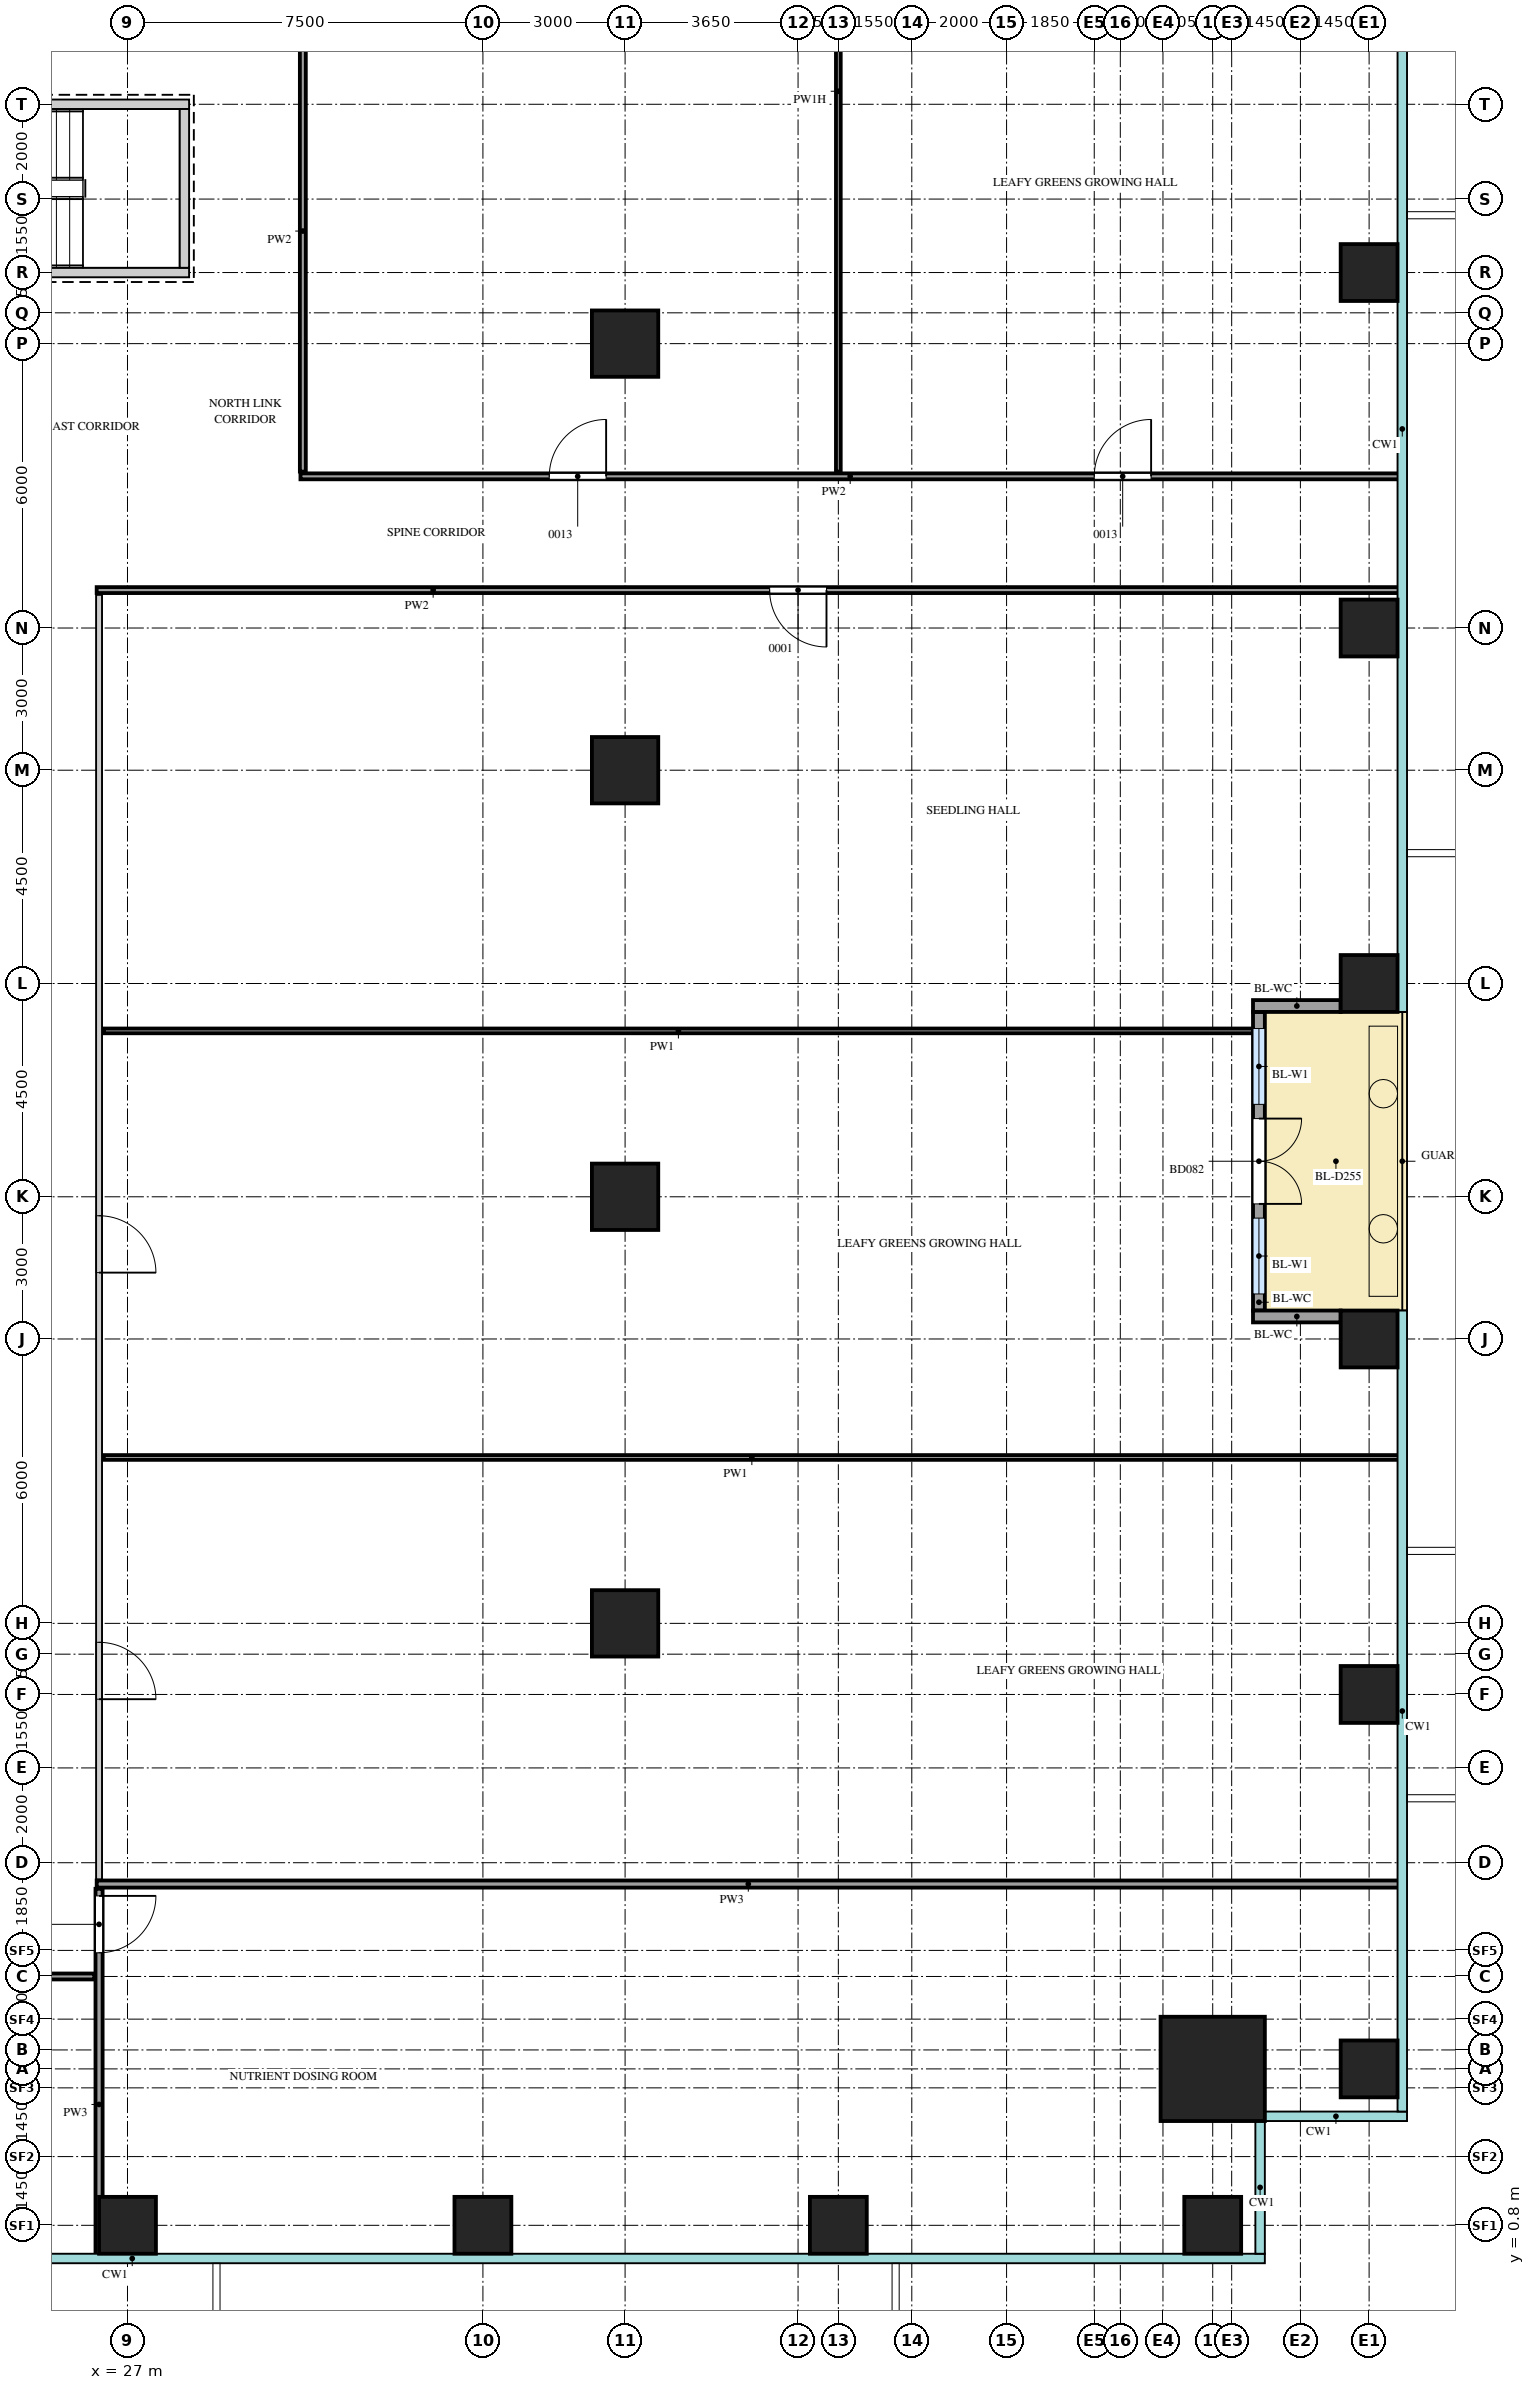
"""IFC4 building model, lengths in metres.
Left out: names, types, materials, properties, quantities, classifications, styles, units other than length and angle.
Written with IfcOpenShell. Run it as: python <this file> out.ifc"""

import sys

from ifc_helpers import new_model, si_unit, direction, frame, frame_2d, origin, origin_2d, place, context, subcontext, project, spatial, rectangle, extrude, source, transform, mapped, element, fill, save


model = new_model("IFC4")
c1 = context("Model", 3, precision=1e-05, world=origin(), true_north=direction((0.0, 1.0)))
c2 = subcontext(c1, "Body", "Model", "MODEL_VIEW")
j1 = project(units=[si_unit("LENGTHUNIT", "METRE"), si_unit("PLANEANGLEUNIT", "RADIAN")], contexts=[c1])
p1 = place(None, origin())
s1 = spatial("IfcSite", under=j1, at=p1, CompositionType="ELEMENT")
p2 = place(p1, origin())
s2 = spatial("IfcBuilding", under=s1, at=p2, CompositionType="ELEMENT")
p3 = place(p2, frame((0.0, 0.0, 42.0)))
s3 = spatial("IfcBuildingStorey", under=s2, at=p3, CompositionType="ELEMENT", Elevation=42.0)
m1 = source(origin(), c2, "Body", "SweptSolid", [
    extrude(rectangle(XDim=7.1, YDim=0.2, at=frame_2d((3.55, 0.0))), origin(), (0.0, 0.0, 1.0), 4.2),
])
p4 = place(p3, frame((21.2, 45.55, 0.0), z_axis=(0.0, 0.0, 1.0), x_axis=(1.0, 0.0, 0.0)))
e1 = element("IfcWall", 1, at=p4, inside=s3, PredefinedType="SHEAR", context=c2, shape_type="MappedRepresentation", body=[
    mapped(m1, transform((0.0, 0.0, 0.0))),
])
m2 = source(origin(), c2, "Body", "SweptSolid", [
    extrude(rectangle(XDim=1.2, YDim=2.1, at=frame_2d((0.6, 1.05))), frame((0.0, 0.11, 0.0), z_axis=(0.0, -1.0, 0.0), x_axis=(1.0, 0.0, 0.0)), (0.0, 0.0, 1.0), 0.22),
])
p5 = place(p4, frame((0.15, 0.0, 0.0)))
e2 = element("IfcOpeningElement", 2, at=p5, cuts=e1, PredefinedType="OPENING", context=c2, shape_type="MappedRepresentation", body=[
    mapped(m2, transform((0.0, 0.0, 0.0))),
])
p6 = place(p3, frame((21.2, 42.0, 0.0), z_axis=(0.0, 0.0, 1.0), x_axis=(1.0, 0.0, 0.0)))
e3 = element("IfcWall", 3, at=p6, inside=s3, PredefinedType="SHEAR", context=c2, shape_type="MappedRepresentation", body=[
    mapped(m1, transform((0.0, 0.0, 0.0))),
])
m3 = source(origin(), c2, "Body", "SweptSolid", [
    extrude(rectangle(XDim=3.35, YDim=0.2, at=frame_2d((1.675, 0.0))), origin(), (0.0, 0.0, 1.0), 4.2),
])
p7 = place(p3, frame((28.2, 42.1, 0.0), z_axis=(0.0, 0.0, 1.0), x_axis=(0.0, 1.0, 0.0)))
e4 = element("IfcWall", 4, at=p7, inside=s3, PredefinedType="SHEAR", context=c2, shape_type="MappedRepresentation", body=[
    mapped(m3, transform((0.0, 0.0, 0.0))),
])
m4 = source(origin(), c2, "Body", "SweptSolid", [
    extrude(rectangle(XDim=2.2, YDim=2.2, at=origin_2d()), origin(), (0.0, 0.0, 1.0), 4.5),
])
p8 = place(p3, frame((49.9, 4.1, 0.0), z_axis=(0.0, 0.0, 1.0), x_axis=(1.0, 0.0, 0.0)))
e5 = element("IfcColumn", 5, at=p8, inside=s3, PredefinedType="COLUMN", context=c2, shape_type="MappedRepresentation", body=[
    mapped(m4, transform((0.0, 0.0, 0.0))),
])
m5 = source(origin(), c2, "Body", "SweptSolid", [
    extrude(rectangle(XDim=1.2, YDim=1.2, at=origin_2d()), origin(), (0.0, 0.0, 1.0), 4.2),
])
for number, where, z_axis, x_axis in (
    (6, (27.0, 0.8, 0.0), (0.0, 0.0, 1.0), (1.0, 0.0, 0.0)),
    (7, (34.5, 0.8, 0.0), (0.0, 0.0, 1.0), (1.0, 0.0, 0.0)),
    (8, (42.0, 0.8, 0.0), (0.0, 0.0, 1.0), (1.0, 0.0, 0.0)),
    (9, (49.9, 0.8, 0.0), (0.0, 0.0, 1.0), (1.0, 0.0, 0.0)),
    (10, (53.2, 4.1, 0.0), (0.0, 0.0, 1.0), (1.0, 0.0, 0.0)),
    (11, (53.2, 12.0, 0.0), (0.0, 0.0, 1.0), (1.0, 0.0, 0.0)),
    (12, (53.2, 19.5, 0.0), (0.0, 0.0, 1.0), (1.0, 0.0, 0.0)),
    (13, (53.2, 27.0, 0.0), (0.0, 0.0, 1.0), (1.0, 0.0, 0.0)),
    (14, (53.2, 34.5, 0.0), (0.0, 0.0, 1.0), (1.0, 0.0, 0.0)),
    (15, (53.2, 42.0, 0.0), (0.0, 0.0, 1.0), (1.0, 0.0, 0.0)),
):
    element("IfcColumn", number, at=place(p3, frame(where, z_axis=z_axis, x_axis=x_axis)), inside=s3, PredefinedType="COLUMN", context=c2, shape_type="MappedRepresentation", body=[
        mapped(m5, transform((0.0, 0.0, 0.0))),
    ])
m6 = source(origin(), c2, "Body", "SweptSolid", [
    extrude(rectangle(XDim=1.4, YDim=1.4, at=origin_2d()), origin(), (0.0, 0.0, 1.0), 4.2),
])
for number, where, z_axis, x_axis in (
    (16, (37.5, 13.5, 0.0), (0.0, 0.0, 1.0), (1.0, 0.0, 0.0)),
    (17, (37.5, 22.5, 0.0), (0.0, 0.0, 1.0), (1.0, 0.0, 0.0)),
    (18, (37.5, 31.5, 0.0), (0.0, 0.0, 1.0), (1.0, 0.0, 0.0)),
    (19, (37.5, 40.5, 0.0), (0.0, 0.0, 1.0), (1.0, 0.0, 0.0)),
):
    element("IfcColumn", number, at=place(p3, frame(where, z_axis=z_axis, x_axis=x_axis)), inside=s3, PredefinedType="COLUMN", context=c2, shape_type="MappedRepresentation", body=[
        mapped(m6, transform((0.0, 0.0, 0.0))),
    ])
m7 = source(origin(), c2, "Body", "SweptSolid", [
    extrude(rectangle(XDim=6.3, YDim=0.25, at=frame_2d((3.15, 0.0))), origin(), (0.0, 0.0, 1.0), 3.6),
])
p9 = place(p3, frame((50.875, 20.1, 0.0), z_axis=(0.0, 0.0, 1.0), x_axis=(0.0, 1.0, 0.0)))
e20 = element("IfcWall", 20, at=p9, inside=s3, PredefinedType="SOLIDWALL", context=c2, shape_type="MappedRepresentation", body=[
    mapped(m7, transform((0.0, 0.0, 0.0))),
])
m8 = source(origin(), c2, "Body", "SweptSolid", [
    extrude(rectangle(XDim=1.6, YDim=2.4, at=frame_2d((0.8, 1.2))), frame((0.0, 0.135, 0.0), z_axis=(0.0, -1.0, 0.0), x_axis=(1.0, 0.0, 0.0)), (0.0, 0.0, 1.0), 0.27),
])
p10 = place(p9, frame((0.35, 0.0, 0.0)))
e21 = element("IfcOpeningElement", 21, at=p10, cuts=e20, PredefinedType="OPENING", context=c2, shape_type="MappedRepresentation", body=[
    mapped(m8, transform((0.0, 0.0, 0.0))),
])
p11 = place(p9, frame((4.35, 0.0, 0.0)))
e22 = element("IfcOpeningElement", 22, at=p11, cuts=e20, PredefinedType="OPENING", context=c2, shape_type="MappedRepresentation", body=[
    mapped(m8, transform((0.0, 0.0, 0.0))),
])
m9 = source(origin(), c2, "Body", "SweptSolid", [
    extrude(rectangle(XDim=1.8, YDim=2.4, at=frame_2d((0.9, 1.2))), frame((0.0, 0.135, 0.0), z_axis=(0.0, -1.0, 0.0), x_axis=(1.0, 0.0, 0.0)), (0.0, 0.0, 1.0), 0.27),
])
p12 = place(p9, frame((2.25, 0.0, 0.0)))
e23 = element("IfcOpeningElement", 23, at=p12, cuts=e20, PredefinedType="OPENING", context=c2, shape_type="MappedRepresentation", body=[
    mapped(m9, transform((0.0, 0.0, 0.0))),
])
m10 = source(origin(), c2, "Body", "SweptSolid", [
    extrude(rectangle(XDim=1.85, YDim=0.25, at=frame_2d((0.925, 0.0))), origin(), (0.0, 0.0, 1.0), 3.6),
])
for number, where, z_axis, x_axis in (
    (24, (52.6, 19.975, 0.0), (0.0, 0.0, 1.0), (-1.0, 0.0, 0.0)),
    (25, (52.6, 26.525, 0.0), (0.0, 0.0, 1.0), (-1.0, 0.0, 0.0)),
):
    element("IfcWall", number, at=place(p3, frame(where, z_axis=z_axis, x_axis=x_axis)), inside=s3, PredefinedType="SOLIDWALL", context=c2, shape_type="MappedRepresentation", body=[
        mapped(m10, transform((0.0, 0.0, 0.0))),
    ])
m11 = source(origin(), c2, "Body", "SweptSolid", [
    extrude(rectangle(XDim=7.75, YDim=0.15, at=frame_2d((3.875, 0.0))), origin(), (0.0, 0.0, 1.0), 4.3),
])
p13 = place(p3, frame((26.4, 0.15, 0.0), z_axis=(0.0, 0.0, 1.0), x_axis=(0.0, 1.0, 0.0)))
e26 = element("IfcWall", 26, at=p13, inside=s3, PredefinedType="PARTITIONING", context=c2, shape_type="MappedRepresentation", body=[
    mapped(m11, transform((0.0, 0.0, 0.0))),
])
m12 = source(origin(), c2, "Body", "SweptSolid", [
    extrude(rectangle(XDim=1.2, YDim=2.1, at=frame_2d((0.6, 1.05))), frame((0.0, 0.085, 0.0), z_axis=(0.0, -1.0, 0.0), x_axis=(1.0, 0.0, 0.0)), (0.0, 0.0, 1.0), 0.17),
])
p14 = place(p13, frame((6.4, 0.0, 0.0)))
e27 = element("IfcOpeningElement", 27, at=p14, cuts=e26, PredefinedType="OPENING", context=c2, shape_type="MappedRepresentation", body=[
    mapped(m12, transform((0.0, 0.0, 0.0))),
])
m13 = source(origin(), c2, "Body", "SweptSolid", [
    extrude(rectangle(XDim=22.15, YDim=0.125, at=frame_2d((11.075, 0.0))), origin(), (0.0, 0.0, 1.0), 4.3),
])
p15 = place(p3, frame((4.15, 6.05, 0.0), z_axis=(0.0, 0.0, 1.0), x_axis=(1.0, 0.0, 0.0)))
e28 = element("IfcWall", 28, at=p15, inside=s3, PredefinedType="PARTITIONING", context=c2, shape_type="MappedRepresentation", body=[
    mapped(m13, transform((0.0, 0.0, 0.0))),
])
m14 = source(origin(), c2, "Body", "SweptSolid", [
    extrude(rectangle(XDim=0.9, YDim=2.1, at=frame_2d((0.45, 1.05))), frame((0.0, 0.073, 0.0), z_axis=(0.0, -1.0, 0.0), x_axis=(1.0, 0.0, 0.0)), (0.0, 0.0, 1.0), 0.145),
])
p16 = place(p15, frame((3.5, 0.0, 0.0)))
e29 = element("IfcOpeningElement", 29, at=p16, cuts=e28, PredefinedType="OPENING", context=c2, shape_type="MappedRepresentation", body=[
    mapped(m14, transform((0.0, 0.0, 0.0))),
])
m15 = source(origin(), c2, "Body", "SweptSolid", [
    extrude(rectangle(XDim=1.2, YDim=2.1, at=frame_2d((0.6, 1.05))), frame((0.0, 0.073, 0.0), z_axis=(0.0, -1.0, 0.0), x_axis=(1.0, 0.0, 0.0)), (0.0, 0.0, 1.0), 0.145),
])
p17 = place(p15, frame((13.25, 0.0, 0.0)))
e30 = element("IfcOpeningElement", 30, at=p17, cuts=e28, PredefinedType="OPENING", context=c2, shape_type="MappedRepresentation", body=[
    mapped(m15, transform((0.0, 0.0, 0.0))),
])
m16 = source(origin(), c2, "Body", "SweptSolid", [
    extrude(rectangle(XDim=27.5, YDim=0.15, at=frame_2d((13.75, 0.0))), origin(), (0.0, 0.0, 1.0), 4.3),
])
p18 = place(p3, frame((26.35, 8.0, 0.0), z_axis=(0.0, 0.0, 1.0), x_axis=(1.0, 0.0, 0.0)))
e31 = element("IfcWall", 31, at=p18, inside=s3, PredefinedType="PARTITIONING", context=c2, shape_type="MappedRepresentation", body=[
    mapped(m16, transform((0.0, 0.0, 0.0))),
])
m17 = source(origin(), c2, "Body", "SweptSolid", [
    extrude(rectangle(XDim=27.1, YDim=0.125, at=frame_2d((13.55, 0.0))), origin(), (0.0, 0.0, 1.0), 4.3),
])
p19 = place(p3, frame((26.4, 8.1, 0.0), z_axis=(0.0, 0.0, 1.0), x_axis=(0.0, 1.0, 0.0)))
e32 = element("IfcWall", 32, at=p19, inside=s3, PredefinedType="PARTITIONING", context=c2, shape_type="MappedRepresentation", body=[
    mapped(m17, transform((0.0, 0.0, 0.0))),
])
p20 = place(p19, frame((3.8, 0.0, 0.0)))
e33 = element("IfcOpeningElement", 33, at=p20, cuts=e32, PredefinedType="OPENING", context=c2, shape_type="MappedRepresentation", body=[
    mapped(m15, transform((0.0, 0.0, 0.0))),
])
p21 = place(p19, frame((12.8, 0.0, 0.0)))
e34 = element("IfcOpeningElement", 34, at=p21, cuts=e32, PredefinedType="OPENING", context=c2, shape_type="MappedRepresentation", body=[
    mapped(m15, transform((0.0, 0.0, 0.0))),
])
m18 = source(origin(), c2, "Body", "SweptSolid", [
    extrude(rectangle(XDim=27.35, YDim=0.1, at=frame_2d((13.675, 0.0))), origin(), (0.0, 0.0, 1.0), 4.3),
])
p22 = place(p3, frame((26.5, 17.0, 0.0), z_axis=(0.0, 0.0, 1.0), x_axis=(1.0, 0.0, 0.0)))
e35 = element("IfcWall", 35, at=p22, inside=s3, PredefinedType="PARTITIONING", context=c2, shape_type="MappedRepresentation", body=[
    mapped(m18, transform((0.0, 0.0, 0.0))),
])
m19 = source(origin(), c2, "Body", "SweptSolid", [
    extrude(rectangle(XDim=24.25, YDim=0.1, at=frame_2d((12.125, 0.0))), origin(), (0.0, 0.0, 1.0), 4.3),
])
p23 = place(p3, frame((26.5, 26.0, 0.0), z_axis=(0.0, 0.0, 1.0), x_axis=(1.0, 0.0, 0.0)))
e36 = element("IfcWall", 36, at=p23, inside=s3, PredefinedType="PARTITIONING", context=c2, shape_type="MappedRepresentation", body=[
    mapped(m19, transform((0.0, 0.0, 0.0))),
])
m20 = source(origin(), c2, "Body", "SweptSolid", [
    extrude(rectangle(XDim=27.5, YDim=0.125, at=frame_2d((13.75, 0.0))), origin(), (0.0, 0.0, 1.0), 4.3),
])
p24 = place(p3, frame((26.35, 35.3, 0.0), z_axis=(0.0, 0.0, 1.0), x_axis=(1.0, 0.0, 0.0)))
e37 = element("IfcWall", 37, at=p24, inside=s3, PredefinedType="PARTITIONING", context=c2, shape_type="MappedRepresentation", body=[
    mapped(m20, transform((0.0, 0.0, 0.0))),
])
p25 = place(p24, frame((14.2, 0.0, 0.0)))
e38 = element("IfcOpeningElement", 38, at=p25, cuts=e37, PredefinedType="OPENING", context=c2, shape_type="MappedRepresentation", body=[
    mapped(m15, transform((0.0, 0.0, 0.0))),
])
m21 = source(origin(), c2, "Body", "SweptSolid", [
    extrude(rectangle(XDim=23.2, YDim=0.125, at=frame_2d((11.6, 0.0))), origin(), (0.0, 0.0, 1.0), 4.3),
])
p26 = place(p3, frame((30.65, 37.7, 0.0), z_axis=(0.0, 0.0, 1.0), x_axis=(1.0, 0.0, 0.0)))
e39 = element("IfcWall", 39, at=p26, inside=s3, PredefinedType="PARTITIONING", context=c2, shape_type="MappedRepresentation", body=[
    mapped(m21, transform((0.0, 0.0, 0.0))),
])
p27 = place(p26, frame((5.25, 0.0, 0.0)))
e40 = element("IfcOpeningElement", 40, at=p27, cuts=e39, PredefinedType="OPENING", context=c2, shape_type="MappedRepresentation", body=[
    mapped(m15, transform((0.0, 0.0, 0.0))),
])
p28 = place(p26, frame((16.75, 0.0, 0.0)))
e41 = element("IfcOpeningElement", 41, at=p28, cuts=e39, PredefinedType="OPENING", context=c2, shape_type="MappedRepresentation", body=[
    mapped(m15, transform((0.0, 0.0, 0.0))),
])
m22 = source(origin(), c2, "Body", "SweptSolid", [
    extrude(rectangle(XDim=10.15, YDim=0.125, at=frame_2d((5.075, 0.0))), origin(), (0.0, 0.0, 1.0), 4.3),
])
p29 = place(p3, frame((30.7, 37.8, 0.0), z_axis=(0.0, 0.0, 1.0), x_axis=(0.0, 1.0, 0.0)))
e42 = element("IfcWall", 42, at=p29, inside=s3, PredefinedType="PARTITIONING", context=c2, shape_type="MappedRepresentation", body=[
    mapped(m22, transform((0.0, 0.0, 0.0))),
])
m23 = source(origin(), c2, "Body", "SweptSolid", [
    extrude(rectangle(XDim=16.05, YDim=0.1, at=frame_2d((8.025, 0.0))), origin(), (0.0, 0.0, 1.0), 3.7),
])
p30 = place(p3, frame((42.0, 37.8, 0.0), z_axis=(0.0, 0.0, 1.0), x_axis=(0.0, 1.0, 0.0)))
e43 = element("IfcWall", 43, at=p30, inside=s3, PredefinedType="PARTITIONING", context=c2, shape_type="MappedRepresentation", body=[
    mapped(m23, transform((0.0, 0.0, 0.0))),
])
m24 = source(origin(), c2, "Body", "SweptSolid", [
    extrude(rectangle(XDim=1.6, YDim=2.4, at=frame_2d((0.8, 1.2))), frame((0.0, 0.03, 0.0), z_axis=(0.0, -1.0, 0.0), x_axis=(1.0, 0.0, 0.0)), (0.0, 0.0, 1.0), 0.06),
])
p31 = place(p10, origin())
e44 = element("IfcWindow", 44, at=p31, inside=s3, PartitioningType="SINGLE_PANEL", PredefinedType="WINDOW", context=c2, shape_type="MappedRepresentation", body=[
    mapped(m24, transform((0.0, 0.0, 0.0))),
])
fill(e21, e44)
p32 = place(p11, origin())
e45 = element("IfcWindow", 45, at=p32, inside=s3, PartitioningType="SINGLE_PANEL", PredefinedType="WINDOW", context=c2, shape_type="MappedRepresentation", body=[
    mapped(m24, transform((0.0, 0.0, 0.0))),
])
fill(e22, e45)
m25 = source(origin(), c2, "Body", "SweptSolid", [
    extrude(rectangle(XDim=1.8, YDim=2.4, at=frame_2d((0.9, 1.2))), frame((0.0, 0.025, 0.0), z_axis=(0.0, -1.0, 0.0), x_axis=(1.0, 0.0, 0.0)), (0.0, 0.0, 1.0), 0.05),
])
p33 = place(p12, origin())
e46 = element("IfcDoor", 46, at=p33, inside=s3, OperationType="DOUBLE_DOOR_DOUBLE_SWING", PredefinedType="DOOR", context=c2, shape_type="MappedRepresentation", body=[
    mapped(m25, transform((0.0, 0.0, 0.0))),
])
fill(e23, e46)
m26 = source(origin(), c2, "Body", "SweptSolid", [
    extrude(rectangle(XDim=1.2, YDim=2.1, at=frame_2d((0.6, 1.05))), frame((0.0, 0.025, 0.0), z_axis=(0.0, -1.0, 0.0), x_axis=(1.0, 0.0, 0.0)), (0.0, 0.0, 1.0), 0.05),
])
p34 = place(p14, origin())
e47 = element("IfcDoor", 47, at=p34, inside=s3, OperationType="SINGLE_SWING_RIGHT", PredefinedType="DOOR", context=c2, shape_type="MappedRepresentation", body=[
    mapped(m26, transform((0.0, 0.0, 0.0))),
])
fill(e27, e47)
p35 = place(p20, origin())
e48 = element("IfcDoor", 48, at=p35, inside=s3, OperationType="SINGLE_SWING_LEFT", PredefinedType="DOOR", context=c2, shape_type="MappedRepresentation", body=[
    mapped(m26, transform((0.0, 0.0, 0.0))),
])
fill(e33, e48)
p36 = place(p21, origin())
e49 = element("IfcDoor", 49, at=p36, inside=s3, OperationType="SINGLE_SWING_LEFT", PredefinedType="DOOR", context=c2, shape_type="MappedRepresentation", body=[
    mapped(m26, transform((0.0, 0.0, 0.0))),
])
fill(e34, e49)
p37 = place(p25, origin())
e50 = element("IfcDoor", 50, at=p37, inside=s3, OperationType="SINGLE_SWING_RIGHT", PredefinedType="DOOR", context=c2, shape_type="MappedRepresentation", body=[
    mapped(m26, transform((0.0, 0.0, 0.0))),
])
fill(e38, e50)
p38 = place(p27, origin())
e51 = element("IfcDoor", 51, at=p38, inside=s3, OperationType="SINGLE_SWING_LEFT", PredefinedType="DOOR", context=c2, shape_type="MappedRepresentation", body=[
    mapped(m26, transform((0.0, 0.0, 0.0))),
])
fill(e40, e51)
p39 = place(p28, origin())
e52 = element("IfcDoor", 52, at=p39, inside=s3, OperationType="SINGLE_SWING_LEFT", PredefinedType="DOOR", context=c2, shape_type="MappedRepresentation", body=[
    mapped(m26, transform((0.0, 0.0, 0.0))),
])
fill(e41, e52)
save(model, sys.argv[1])
